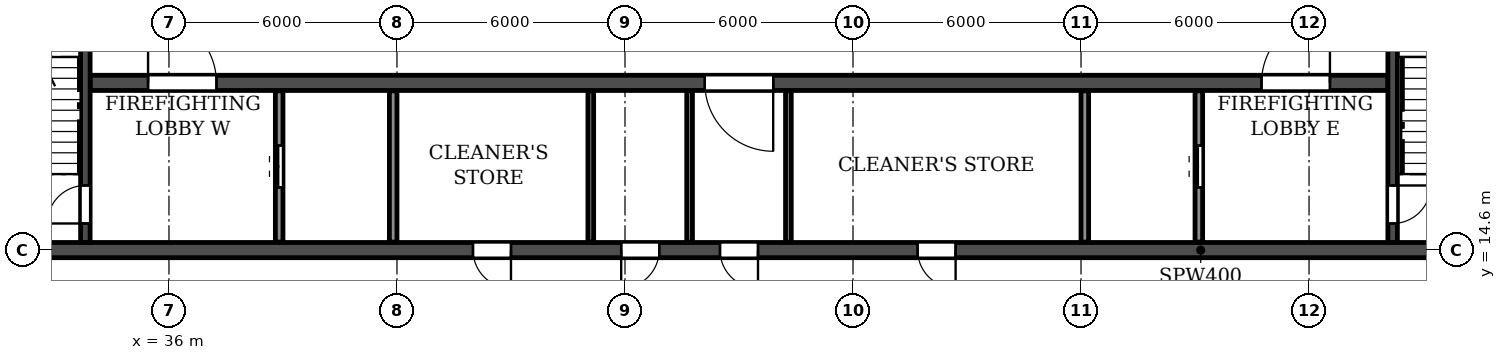
"""IFC4 building model, lengths in metres.
Left out: names, types, materials, properties, quantities, classifications, styles, units other than length and angle.
Written with IfcOpenShell. Run it as: python <this file> out.ifc"""

import sys

from ifc_helpers import new_model, si_unit, direction, frame, frame_2d, origin, place, context, subcontext, project, spatial, rectangle, extrude, element, fill, save


model = new_model("IFC4")
c1 = context("Model", 3, precision=1e-05, world=origin(), true_north=direction((0.0, 1.0)))
c2 = subcontext(c1, "Body", "Model", "MODEL_VIEW")
j1 = project(units=[si_unit("LENGTHUNIT", "METRE"), si_unit("PLANEANGLEUNIT", "RADIAN")], contexts=[c1])
p1 = place(None, origin())
s1 = spatial("IfcSite", under=j1, at=p1, CompositionType="ELEMENT")
p2 = place(p1, origin())
s2 = spatial("IfcBuilding", under=s1, at=p2, CompositionType="ELEMENT")
p3 = place(p2, frame((0.0, 0.0, 175.2)))
s3 = spatial("IfcBuildingStorey", under=s2, at=p3, CompositionType="ELEMENT", Elevation=175.2)
p4 = place(p3, frame((18.2, 14.6, 0.0), z_axis=(0.0, 0.0, 1.0), x_axis=(1.0, 0.0, 0.0)))
e1 = element("IfcWall", 1, at=p4, inside=s3, PredefinedType="SOLIDWALL", context=c2, shape_type="SweptSolid", body=[
    extrude(rectangle(XDim=65.6, YDim=0.4, at=frame_2d((32.8, 0.0))), origin(), (0.0, 0.0, 1.0), 3.08),
])
p5 = place(p4, frame((0.7, 0.0, 0.0)))
e2 = element("IfcOpeningElement", 2, at=p5, cuts=e1, PredefinedType="OPENING", context=c2, shape_type="SweptSolid", body=[
    extrude(rectangle(XDim=1.0, YDim=2.1, at=frame_2d((0.5, 1.05))), frame((0.0, 0.21, 0.0), z_axis=(0.0, -1.0, 0.0), x_axis=(1.0, 0.0, 0.0)), (0.0, 0.0, 1.0), 0.42),
])
p6 = place(p4, frame((8.6, 0.0, 0.0)))
e3 = element("IfcOpeningElement", 3, at=p6, cuts=e1, PredefinedType="OPENING", context=c2, shape_type="SweptSolid", body=[
    extrude(rectangle(XDim=1.0, YDim=2.1, at=frame_2d((0.5, 1.05))), frame((0.0, 0.21, 0.0), z_axis=(0.0, -1.0, 0.0), x_axis=(1.0, 0.0, 0.0)), (0.0, 0.0, 1.0), 0.42),
])
p7 = place(p4, frame((13.2, 0.0, 0.0)))
e4 = element("IfcOpeningElement", 4, at=p7, cuts=e1, PredefinedType="OPENING", context=c2, shape_type="SweptSolid", body=[
    extrude(rectangle(XDim=1.0, YDim=2.1, at=frame_2d((0.5, 1.05))), frame((0.0, 0.21, 0.0), z_axis=(0.0, -1.0, 0.0), x_axis=(1.0, 0.0, 0.0)), (0.0, 0.0, 1.0), 0.42),
])
p8 = place(p4, frame((25.8, 0.0, 0.0)))
e5 = element("IfcOpeningElement", 5, at=p8, cuts=e1, PredefinedType="OPENING", context=c2, shape_type="SweptSolid", body=[
    extrude(rectangle(XDim=1.0, YDim=2.1, at=frame_2d((0.5, 1.05))), frame((0.0, 0.21, 0.0), z_axis=(0.0, -1.0, 0.0), x_axis=(1.0, 0.0, 0.0)), (0.0, 0.0, 1.0), 0.42),
])
p9 = place(p4, frame((29.7, 0.0, 0.0)))
e6 = element("IfcOpeningElement", 6, at=p9, cuts=e1, PredefinedType="OPENING", context=c2, shape_type="SweptSolid", body=[
    extrude(rectangle(XDim=1.0, YDim=2.1, at=frame_2d((0.5, 1.05))), frame((0.0, 0.21, 0.0), z_axis=(0.0, -1.0, 0.0), x_axis=(1.0, 0.0, 0.0)), (0.0, 0.0, 1.0), 0.42),
])
p10 = place(p4, frame((32.3, 0.0, 0.0)))
e7 = element("IfcOpeningElement", 7, at=p10, cuts=e1, PredefinedType="OPENING", context=c2, shape_type="SweptSolid", body=[
    extrude(rectangle(XDim=1.0, YDim=2.1, at=frame_2d((0.5, 1.05))), frame((0.0, 0.21, 0.0), z_axis=(0.0, -1.0, 0.0), x_axis=(1.0, 0.0, 0.0)), (0.0, 0.0, 1.0), 0.42),
])
p11 = place(p4, frame((37.5, 0.0, 0.0)))
e8 = element("IfcOpeningElement", 8, at=p11, cuts=e1, PredefinedType="OPENING", context=c2, shape_type="SweptSolid", body=[
    extrude(rectangle(XDim=1.0, YDim=2.1, at=frame_2d((0.5, 1.05))), frame((0.0, 0.21, 0.0), z_axis=(0.0, -1.0, 0.0), x_axis=(1.0, 0.0, 0.0)), (0.0, 0.0, 1.0), 0.42),
])
p12 = place(p4, frame((51.4, 0.0, 0.0)))
e9 = element("IfcOpeningElement", 9, at=p12, cuts=e1, PredefinedType="OPENING", context=c2, shape_type="SweptSolid", body=[
    extrude(rectangle(XDim=1.0, YDim=2.1, at=frame_2d((0.5, 1.05))), frame((0.0, 0.21, 0.0), z_axis=(0.0, -1.0, 0.0), x_axis=(1.0, 0.0, 0.0)), (0.0, 0.0, 1.0), 0.42),
])
p13 = place(p4, frame((56.0, 0.0, 0.0)))
e10 = element("IfcOpeningElement", 10, at=p13, cuts=e1, PredefinedType="OPENING", context=c2, shape_type="SweptSolid", body=[
    extrude(rectangle(XDim=1.0, YDim=2.1, at=frame_2d((0.5, 1.05))), frame((0.0, 0.21, 0.0), z_axis=(0.0, -1.0, 0.0), x_axis=(1.0, 0.0, 0.0)), (0.0, 0.0, 1.0), 0.42),
])
p14 = place(p4, frame((63.9, 0.0, 0.0)))
e11 = element("IfcOpeningElement", 11, at=p14, cuts=e1, PredefinedType="OPENING", context=c2, shape_type="SweptSolid", body=[
    extrude(rectangle(XDim=1.0, YDim=2.1, at=frame_2d((0.5, 1.05))), frame((0.0, 0.21, 0.0), z_axis=(0.0, -1.0, 0.0), x_axis=(1.0, 0.0, 0.0)), (0.0, 0.0, 1.0), 0.42),
])
p15 = place(p3, frame((33.925, 19.0, 0.0), z_axis=(0.0, 0.0, 1.0), x_axis=(1.0, 0.0, 0.0)))
e12 = element("IfcWall", 12, at=p15, inside=s3, PredefinedType="SOLIDWALL", context=c2, shape_type="SweptSolid", body=[
    extrude(rectangle(XDim=34.15, YDim=0.4, at=frame_2d((17.075, 0.0))), origin(), (0.0, 0.0, 1.0), 3.08),
])
p16 = place(p15, frame((16.175, 0.0, 0.0)))
e13 = element("IfcOpeningElement", 13, at=p16, cuts=e12, PredefinedType="OPENING", context=c2, shape_type="SweptSolid", body=[
    extrude(rectangle(XDim=1.8, YDim=2.1, at=frame_2d((0.9, 1.05))), frame((0.0, 0.21, 0.0), z_axis=(0.0, -1.0, 0.0), x_axis=(1.0, 0.0, 0.0)), (0.0, 0.0, 1.0), 0.42),
])
p17 = place(p15, frame((1.525, 0.0, 0.0)))
e14 = element("IfcOpeningElement", 14, at=p17, cuts=e12, PredefinedType="OPENING", context=c2, shape_type="SweptSolid", body=[
    extrude(rectangle(XDim=1.8, YDim=2.1, at=frame_2d((0.9, 1.05))), frame((0.0, 0.21, 0.0), z_axis=(0.0, -1.0, 0.0), x_axis=(1.0, 0.0, 0.0)), (0.0, 0.0, 1.0), 0.42),
])
p18 = place(p15, frame((30.825, 0.0, 0.0)))
e15 = element("IfcOpeningElement", 15, at=p18, cuts=e12, PredefinedType="OPENING", context=c2, shape_type="SweptSolid", body=[
    extrude(rectangle(XDim=1.8, YDim=2.1, at=frame_2d((0.9, 1.05))), frame((0.0, 0.21, 0.0), z_axis=(0.0, -1.0, 0.0), x_axis=(1.0, 0.0, 0.0)), (0.0, 0.0, 1.0), 0.42),
])
p19 = place(p3, frame((33.8, 14.8, 0.0), z_axis=(0.0, 0.0, 1.0), x_axis=(0.0, 1.0, 0.0)))
e16 = element("IfcWall", 16, at=p19, inside=s3, PredefinedType="SOLIDWALL", context=c2, shape_type="SweptSolid", body=[
    extrude(rectangle(XDim=7.675, YDim=0.25, at=frame_2d((3.837, 0.0))), origin(), (0.0, 0.0, 1.0), 3.08),
])
p20 = place(p19, frame((0.5, 0.0, 0.0)))
e17 = element("IfcOpeningElement", 17, at=p20, cuts=e16, PredefinedType="OPENING", context=c2, shape_type="SweptSolid", body=[
    extrude(rectangle(XDim=1.0, YDim=2.1, at=frame_2d((0.5, 1.05))), frame((0.0, 0.135, 0.0), z_axis=(0.0, -1.0, 0.0), x_axis=(1.0, 0.0, 0.0)), (0.0, 0.0, 1.0), 0.27),
])
p21 = place(p3, frame((68.2, 14.8, 0.0), z_axis=(0.0, 0.0, 1.0), x_axis=(0.0, 1.0, 0.0)))
e18 = element("IfcWall", 18, at=p21, inside=s3, PredefinedType="SOLIDWALL", context=c2, shape_type="SweptSolid", body=[
    extrude(rectangle(XDim=7.675, YDim=0.25, at=frame_2d((3.837, 0.0))), origin(), (0.0, 0.0, 1.0), 3.08),
])
p22 = place(p21, frame((0.5, 0.0, 0.0)))
e19 = element("IfcOpeningElement", 19, at=p22, cuts=e18, PredefinedType="OPENING", context=c2, shape_type="SweptSolid", body=[
    extrude(rectangle(XDim=1.0, YDim=2.1, at=frame_2d((0.5, 1.05))), frame((0.0, 0.135, 0.0), z_axis=(0.0, -1.0, 0.0), x_axis=(1.0, 0.0, 0.0)), (0.0, 0.0, 1.0), 0.27),
])
for number, where, z_axis, x_axis in (
    (20, (49.7, 14.81, 0.0), (0.0, 0.0, 1.0), (0.0, 1.0, 0.0)),
    (21, (52.3, 14.81, 0.0), (0.0, 0.0, 1.0), (0.0, 1.0, 0.0)),
    (22, (47.1, 14.81, 0.0), (0.0, 0.0, 1.0), (0.0, 1.0, 0.0)),
):
    element("IfcWall", number, at=place(p3, frame(where, z_axis=z_axis, x_axis=x_axis)), inside=s3, PredefinedType="PARTITIONING", context=c2, shape_type="SweptSolid", body=[
        extrude(rectangle(XDim=3.98, YDim=0.15, at=frame_2d((1.99, 0.0))), origin(), (0.0, 0.0, 1.0), 3.08),
    ])
p23 = place(p3, frame((38.9, 14.81, 0.0), z_axis=(0.0, 0.0, 1.0), x_axis=(0.0, 1.0, 0.0)))
e23 = element("IfcWall", 23, at=p23, inside=s3, PredefinedType="PARTITIONING", context=c2, shape_type="SweptSolid", body=[
    extrude(rectangle(XDim=3.98, YDim=0.2, at=frame_2d((1.99, 0.0))), origin(), (0.0, 0.0, 1.0), 3.08),
])
p24 = place(p23, frame((1.44, 0.0, 0.0)))
e24 = element("IfcOpeningElement", 24, at=p24, cuts=e23, PredefinedType="OPENING", context=c2, shape_type="SweptSolid", body=[
    extrude(rectangle(XDim=1.1, YDim=2.1, at=frame_2d((0.55, 1.05))), frame((0.0, 0.11, 0.0), z_axis=(0.0, -1.0, 0.0), x_axis=(1.0, 0.0, 0.0)), (0.0, 0.0, 1.0), 0.22),
])
for number, where, z_axis, x_axis in (
    (25, (41.9, 14.81, 0.0), (0.0, 0.0, 1.0), (0.0, 1.0, 0.0)),
    (26, (60.1, 14.81, 0.0), (0.0, 0.0, 1.0), (0.0, 1.0, 0.0)),
):
    element("IfcWall", number, at=place(p3, frame(where, z_axis=z_axis, x_axis=x_axis)), inside=s3, PredefinedType="PARTITIONING", context=c2, shape_type="SweptSolid", body=[
        extrude(rectangle(XDim=3.98, YDim=0.2, at=frame_2d((1.99, 0.0))), origin(), (0.0, 0.0, 1.0), 3.08),
    ])
p25 = place(p3, frame((63.1, 14.81, 0.0), z_axis=(0.0, 0.0, 1.0), x_axis=(0.0, 1.0, 0.0)))
e27 = element("IfcWall", 27, at=p25, inside=s3, PredefinedType="PARTITIONING", context=c2, shape_type="SweptSolid", body=[
    extrude(rectangle(XDim=3.98, YDim=0.2, at=frame_2d((1.99, 0.0))), origin(), (0.0, 0.0, 1.0), 3.08),
])
p26 = place(p25, frame((1.44, 0.0, 0.0)))
e28 = element("IfcOpeningElement", 28, at=p26, cuts=e27, PredefinedType="OPENING", context=c2, shape_type="SweptSolid", body=[
    extrude(rectangle(XDim=1.1, YDim=2.1, at=frame_2d((0.55, 1.05))), frame((0.0, 0.11, 0.0), z_axis=(0.0, -1.0, 0.0), x_axis=(1.0, 0.0, 0.0)), (0.0, 0.0, 1.0), 0.22),
])
p27 = place(p8, frame((1.0, 0.0, 0.0), z_axis=(0.0, 0.0, 1.0), x_axis=(-1.0, 0.0, 0.0)))
e29 = element("IfcDoor", 29, at=p27, inside=s3, OperationType="SINGLE_SWING_LEFT", PredefinedType="DOOR", context=c2, shape_type="SweptSolid", body=[
    extrude(rectangle(XDim=1.0, YDim=2.1, at=frame_2d((0.5, 1.05))), frame((0.0, 0.025, 0.0), z_axis=(0.0, -1.0, 0.0), x_axis=(1.0, 0.0, 0.0)), (0.0, 0.0, 1.0), 0.05),
])
fill(e5, e29)
p28 = place(p9, frame((1.0, 0.0, 0.0), z_axis=(0.0, 0.0, 1.0), x_axis=(-1.0, 0.0, 0.0)))
e30 = element("IfcDoor", 30, at=p28, inside=s3, OperationType="SINGLE_SWING_RIGHT", PredefinedType="DOOR", context=c2, shape_type="SweptSolid", body=[
    extrude(rectangle(XDim=1.0, YDim=2.1, at=frame_2d((0.5, 1.05))), frame((0.0, 0.025, 0.0), z_axis=(0.0, -1.0, 0.0), x_axis=(1.0, 0.0, 0.0)), (0.0, 0.0, 1.0), 0.05),
])
fill(e6, e30)
p29 = place(p10, frame((1.0, 0.0, 0.0), z_axis=(0.0, 0.0, 1.0), x_axis=(-1.0, 0.0, 0.0)))
e31 = element("IfcDoor", 31, at=p29, inside=s3, OperationType="SINGLE_SWING_LEFT", PredefinedType="DOOR", context=c2, shape_type="SweptSolid", body=[
    extrude(rectangle(XDim=1.0, YDim=2.1, at=frame_2d((0.5, 1.05))), frame((0.0, 0.025, 0.0), z_axis=(0.0, -1.0, 0.0), x_axis=(1.0, 0.0, 0.0)), (0.0, 0.0, 1.0), 0.05),
])
fill(e7, e31)
p30 = place(p11, frame((1.0, 0.0, 0.0), z_axis=(0.0, 0.0, 1.0), x_axis=(-1.0, 0.0, 0.0)))
e32 = element("IfcDoor", 32, at=p30, inside=s3, OperationType="SINGLE_SWING_LEFT", PredefinedType="DOOR", context=c2, shape_type="SweptSolid", body=[
    extrude(rectangle(XDim=1.0, YDim=2.1, at=frame_2d((0.5, 1.05))), frame((0.0, 0.025, 0.0), z_axis=(0.0, -1.0, 0.0), x_axis=(1.0, 0.0, 0.0)), (0.0, 0.0, 1.0), 0.05),
])
fill(e8, e32)
p31 = place(p26, origin())
e33 = element("IfcDoor", 33, at=p31, inside=s3, OperationType="DOUBLE_DOOR_SLIDING", PredefinedType="DOOR", context=c2, shape_type="SweptSolid", body=[
    extrude(rectangle(XDim=1.1, YDim=2.1, at=frame_2d((0.55, 1.05))), frame((0.0, 0.025, 0.0), z_axis=(0.0, -1.0, 0.0), x_axis=(1.0, 0.0, 0.0)), (0.0, 0.0, 1.0), 0.05),
])
fill(e28, e33)
p32 = place(p22, frame((1.0, 0.0, 0.0), z_axis=(0.0, 0.0, 1.0), x_axis=(-1.0, 0.0, 0.0)))
e34 = element("IfcDoor", 34, at=p32, inside=s3, OperationType="SINGLE_SWING_LEFT", PredefinedType="DOOR", context=c2, shape_type="SweptSolid", body=[
    extrude(rectangle(XDim=1.0, YDim=2.1, at=frame_2d((0.5, 1.05))), frame((0.0, 0.025, 0.0), z_axis=(0.0, -1.0, 0.0), x_axis=(1.0, 0.0, 0.0)), (0.0, 0.0, 1.0), 0.05),
])
fill(e19, e34)
p33 = place(p20, origin())
e35 = element("IfcDoor", 35, at=p33, inside=s3, OperationType="SINGLE_SWING_LEFT", PredefinedType="DOOR", context=c2, shape_type="SweptSolid", body=[
    extrude(rectangle(XDim=1.0, YDim=2.1, at=frame_2d((0.5, 1.05))), frame((0.0, 0.025, 0.0), z_axis=(0.0, -1.0, 0.0), x_axis=(1.0, 0.0, 0.0)), (0.0, 0.0, 1.0), 0.05),
])
fill(e17, e35)
p34 = place(p24, origin())
e36 = element("IfcDoor", 36, at=p34, inside=s3, OperationType="DOUBLE_DOOR_SLIDING", PredefinedType="DOOR", context=c2, shape_type="SweptSolid", body=[
    extrude(rectangle(XDim=1.1, YDim=2.1, at=frame_2d((0.55, 1.05))), frame((0.0, 0.025, 0.0), z_axis=(0.0, -1.0, 0.0), x_axis=(1.0, 0.0, 0.0)), (0.0, 0.0, 1.0), 0.05),
])
fill(e24, e36)
p35 = place(p16, frame((1.8, 0.0, 0.0), z_axis=(0.0, 0.0, 1.0), x_axis=(-1.0, 0.0, 0.0)))
e37 = element("IfcDoor", 37, at=p35, inside=s3, OperationType="DOUBLE_DOOR_SINGLE_SWING", PredefinedType="DOOR", context=c2, shape_type="SweptSolid", body=[
    extrude(rectangle(XDim=1.8, YDim=2.1, at=frame_2d((0.9, 1.05))), frame((0.0, 0.025, 0.0), z_axis=(0.0, -1.0, 0.0), x_axis=(1.0, 0.0, 0.0)), (0.0, 0.0, 1.0), 0.05),
])
fill(e13, e37)
p36 = place(p17, origin())
e38 = element("IfcDoor", 38, at=p36, inside=s3, OperationType="DOUBLE_DOOR_SINGLE_SWING", PredefinedType="DOOR", context=c2, shape_type="SweptSolid", body=[
    extrude(rectangle(XDim=1.8, YDim=2.1, at=frame_2d((0.9, 1.05))), frame((0.0, 0.025, 0.0), z_axis=(0.0, -1.0, 0.0), x_axis=(1.0, 0.0, 0.0)), (0.0, 0.0, 1.0), 0.05),
])
fill(e14, e38)
p37 = place(p18, origin())
e39 = element("IfcDoor", 39, at=p37, inside=s3, OperationType="DOUBLE_DOOR_SINGLE_SWING", PredefinedType="DOOR", context=c2, shape_type="SweptSolid", body=[
    extrude(rectangle(XDim=1.8, YDim=2.1, at=frame_2d((0.9, 1.05))), frame((0.0, 0.025, 0.0), z_axis=(0.0, -1.0, 0.0), x_axis=(1.0, 0.0, 0.0)), (0.0, 0.0, 1.0), 0.05),
])
fill(e15, e39)
save(model, sys.argv[1])
